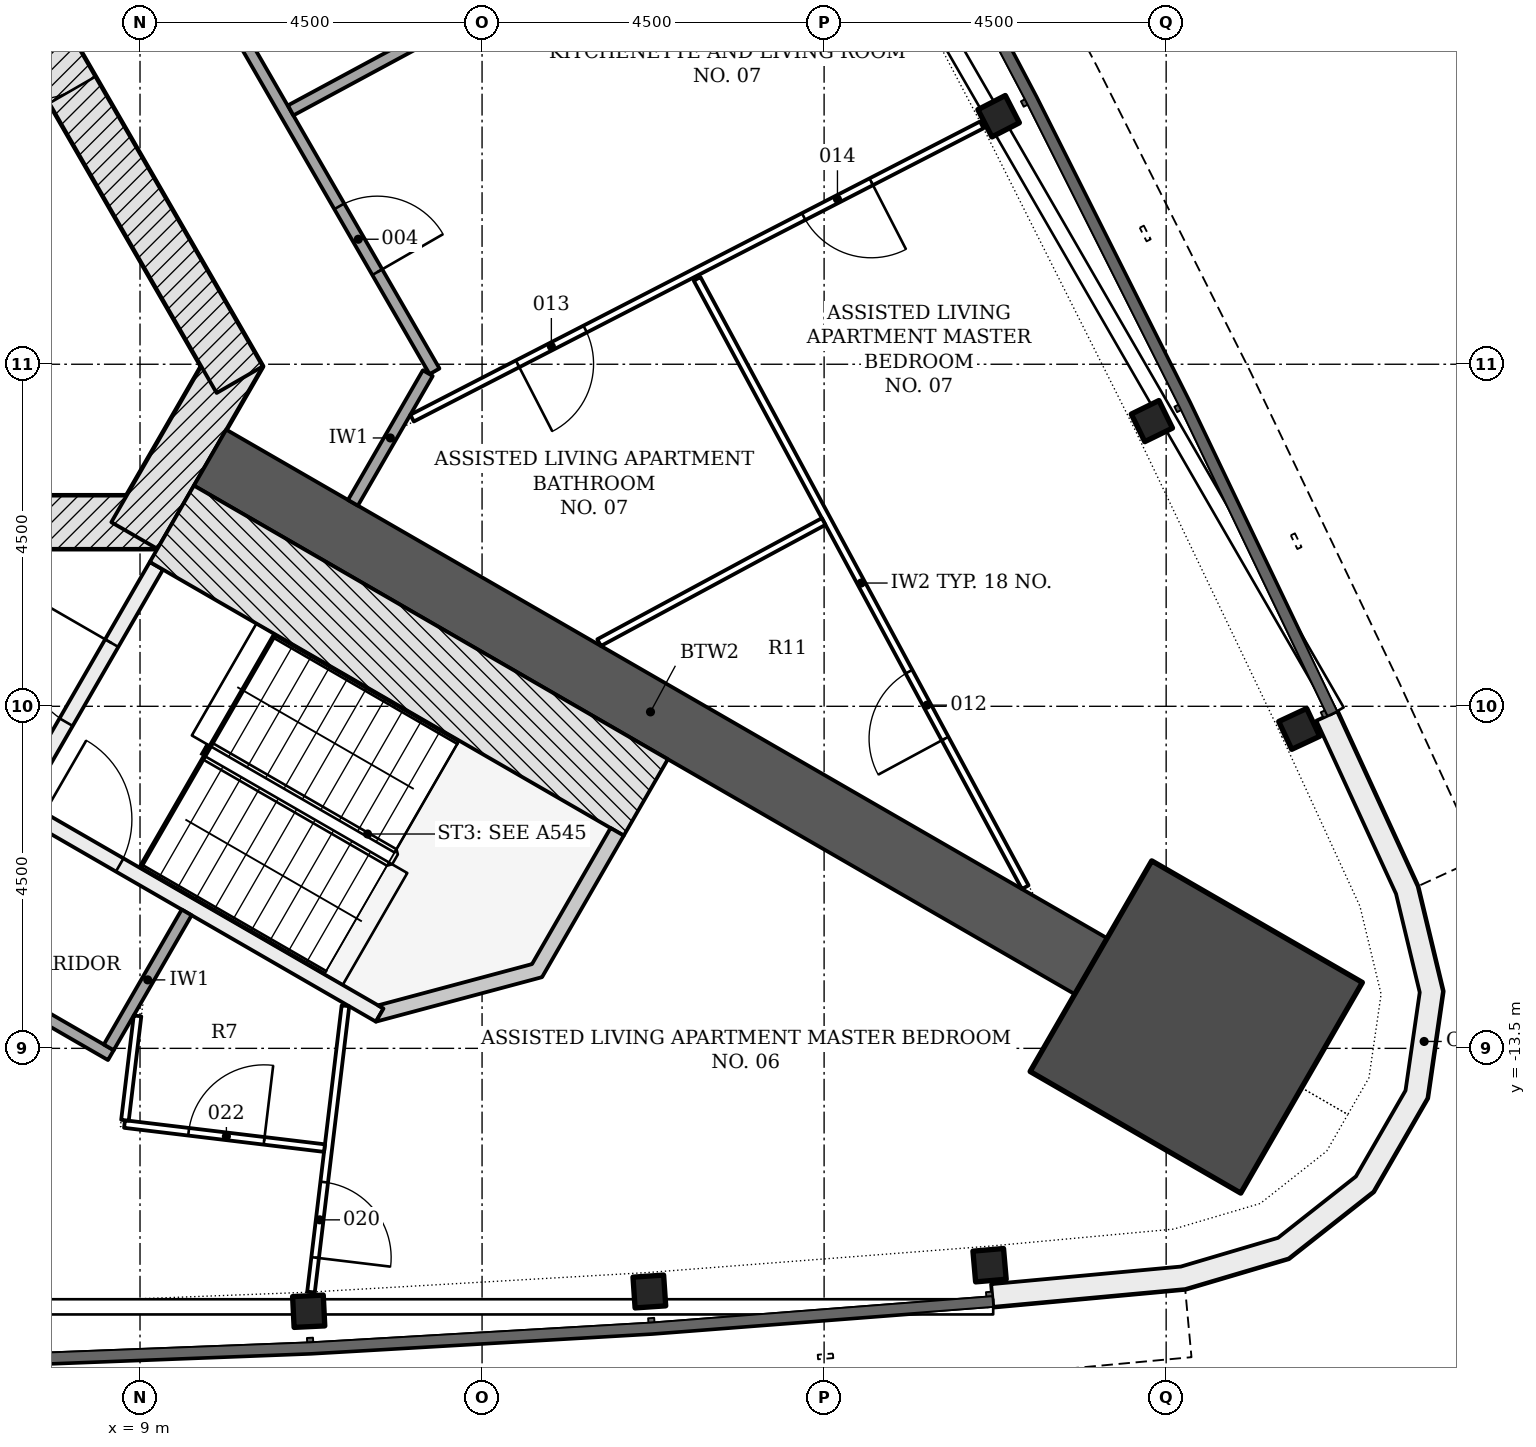
"""IFC4 building model, lengths in metres.
Left out: names, types, materials, properties, quantities, classifications, styles, units other than length and angle.
Written with IfcOpenShell. Run it as: python <this file> out.ifc"""

import sys

from ifc_helpers import new_model, si_unit, direction, frame, frame_2d, origin, origin_2d, place, context, subcontext, project, spatial, polyline, rectangle, i_section, outline, extrude, element, fill, save


model = new_model("IFC4")
c1 = context("Model", 3, precision=1e-05, world=origin(), true_north=direction((0.0, 1.0)))
c2 = subcontext(c1, "Body", "Model", "MODEL_VIEW")
j1 = project(units=[si_unit("LENGTHUNIT", "METRE"), si_unit("PLANEANGLEUNIT", "RADIAN")], contexts=[c1])
p1 = place(None, origin())
s1 = spatial("IfcSite", under=j1, at=p1, CompositionType="ELEMENT")
p2 = place(p1, origin())
s2 = spatial("IfcBuilding", under=s1, at=p2, CompositionType="ELEMENT")
p3 = place(p2, frame((0.0, 0.0, 72.6)))
s3 = spatial("IfcBuildingStorey", under=s2, at=p3, CompositionType="ELEMENT", Elevation=72.6)
p4 = place(p3, frame((-9.229, -6.578, -0.2), z_axis=(0.0, 0.0, 1.0), x_axis=(1.0, 0.0, 0.0)))
e1 = element("IfcWall", 1, at=p4, inside=s3, PredefinedType="SHEAR", context=c2, shape_type="SweptSolid", body=[
    extrude(rectangle(XDim=18.458, YDim=0.7, at=frame_2d((9.229, 0.0))), origin(), (0.0, 0.0, 1.0), 3.6),
])
p5 = place(p4, frame((3.304, 0.0, 0.2)))
e2 = element("IfcOpeningElement", 2, at=p5, cuts=e1, PredefinedType="OPENING", context=c2, shape_type="SweptSolid", body=[
    extrude(rectangle(XDim=1.1, YDim=2.1, at=frame_2d((0.55, 1.05))), frame((0.0, 0.36, 0.0), z_axis=(0.0, -1.0, 0.0), x_axis=(1.0, 0.0, 0.0)), (0.0, 0.0, 1.0), 0.72),
])
p6 = place(p4, frame((5.454, 0.0, 0.2)))
e3 = element("IfcOpeningElement", 3, at=p6, cuts=e1, PredefinedType="OPENING", context=c2, shape_type="SweptSolid", body=[
    extrude(rectangle(XDim=1.1, YDim=2.1, at=frame_2d((0.55, 1.05))), frame((0.0, 0.36, 0.0), z_axis=(0.0, -1.0, 0.0), x_axis=(1.0, 0.0, 0.0)), (0.0, 0.0, 1.0), 0.72),
])
p7 = place(p4, frame((7.604, 0.0, 0.2)))
e4 = element("IfcOpeningElement", 4, at=p7, cuts=e1, PredefinedType="OPENING", context=c2, shape_type="SweptSolid", body=[
    extrude(rectangle(XDim=1.1, YDim=2.1, at=frame_2d((0.55, 1.05))), frame((0.0, 0.36, 0.0), z_axis=(0.0, -1.0, 0.0), x_axis=(1.0, 0.0, 0.0)), (0.0, 0.0, 1.0), 0.72),
])
p8 = place(p4, frame((9.754, 0.0, 0.2)))
e5 = element("IfcOpeningElement", 5, at=p8, cuts=e1, PredefinedType="OPENING", context=c2, shape_type="SweptSolid", body=[
    extrude(rectangle(XDim=1.1, YDim=2.1, at=frame_2d((0.55, 1.05))), frame((0.0, 0.36, 0.0), z_axis=(0.0, -1.0, 0.0), x_axis=(1.0, 0.0, 0.0)), (0.0, 0.0, 1.0), 0.72),
])
p9 = place(p4, frame((11.904, 0.0, 0.2)))
e6 = element("IfcOpeningElement", 6, at=p9, cuts=e1, PredefinedType="OPENING", context=c2, shape_type="SweptSolid", body=[
    extrude(rectangle(XDim=1.1, YDim=2.1, at=frame_2d((0.55, 1.05))), frame((0.0, 0.36, 0.0), z_axis=(0.0, -1.0, 0.0), x_axis=(1.0, 0.0, 0.0)), (0.0, 0.0, 1.0), 0.72),
])
p10 = place(p4, frame((14.054, 0.0, 0.2)))
e7 = element("IfcOpeningElement", 7, at=p10, cuts=e1, PredefinedType="OPENING", context=c2, shape_type="SweptSolid", body=[
    extrude(rectangle(XDim=1.1, YDim=2.1, at=frame_2d((0.55, 1.05))), frame((0.0, 0.36, 0.0), z_axis=(0.0, -1.0, 0.0), x_axis=(1.0, 0.0, 0.0)), (0.0, 0.0, 1.0), 0.72),
])
p11 = place(p4, frame((1.029, 0.0, 0.2)))
e8 = element("IfcOpeningElement", 8, at=p11, cuts=e1, PredefinedType="OPENING", context=c2, shape_type="SweptSolid", body=[
    extrude(rectangle(XDim=1.0, YDim=2.1, at=frame_2d((0.5, 1.05))), frame((0.0, 0.36, 0.0), z_axis=(0.0, -1.0, 0.0), x_axis=(1.0, 0.0, 0.0)), (0.0, 0.0, 1.0), 0.72),
])
p12 = place(p3, frame((8.926, -6.753, -0.2), z_axis=(0.0, 0.0, 1.0), x_axis=(0.500042739161, 0.866000726912, 0.0)))
e9 = element("IfcWall", 9, at=p12, inside=s3, PredefinedType="SHEAR", context=c2, shape_type="SweptSolid", body=[
    extrude(rectangle(XDim=2.771, YDim=0.7, at=frame_2d((1.386, 0.0))), origin(), (0.0, 0.0, 1.0), 3.6),
])
p13 = place(p3, frame((10.311, -4.703, -0.2), z_axis=(0.0, 0.0, 1.0), x_axis=(-0.500001446645, 0.866024568562, 0.0)))
e10 = element("IfcWall", 10, at=p13, inside=s3, PredefinedType="SHEAR", context=c2, shape_type="SweptSolid", body=[
    extrude(rectangle(XDim=18.458, YDim=0.7, at=frame_2d((9.229, 0.0))), origin(), (0.0, 0.0, 1.0), 3.6),
])
p14 = place(p13, frame((9.5, 0.0, 0.2)))
e11 = element("IfcOpeningElement", 11, at=p14, cuts=e10, PredefinedType="OPENING", context=c2, shape_type="SweptSolid", body=[
    extrude(rectangle(XDim=1.0, YDim=2.1, at=frame_2d((0.5, 1.05))), frame((0.0, 0.36, 0.0), z_axis=(0.0, -1.0, 0.0), x_axis=(1.0, 0.0, 0.0)), (0.0, 0.0, 1.0), 0.72),
])
p15 = place(p13, frame((4.402, 0.0, 0.2)))
e12 = element("IfcOpeningElement", 12, at=p15, cuts=e10, PredefinedType="OPENING", context=c2, shape_type="SweptSolid", body=[
    extrude(rectangle(XDim=0.9, YDim=2.1, at=frame_2d((0.45, 1.05))), frame((0.0, 0.36, 0.0), z_axis=(0.0, -1.0, 0.0), x_axis=(1.0, 0.0, 0.0)), (0.0, 0.0, 1.0), 0.72),
])
p16 = place(p13, frame((13.927, 0.0, 0.2)))
e13 = element("IfcOpeningElement", 13, at=p16, cuts=e10, PredefinedType="OPENING", context=c2, shape_type="SweptSolid", body=[
    extrude(rectangle(XDim=0.9, YDim=2.1, at=frame_2d((0.45, 1.05))), frame((0.0, 0.36, 0.0), z_axis=(0.0, -1.0, 0.0), x_axis=(1.0, 0.0, 0.0)), (0.0, 0.0, 1.0), 0.72),
])
p17 = place(p3, frame((9.922, -5.728, -0.2), z_axis=(0.0, 0.0, 1.0), x_axis=(0.866026077102, -0.499998833779, 0.0)))
e14 = element("IfcWall", 14, at=p17, inside=s3, PredefinedType="SHEAR", context=c2, shape_type="SweptSolid", body=[
    extrude(rectangle(XDim=13.381, YDim=0.85, at=frame_2d((6.691, 0.0))), origin(), (0.0, 0.0, 1.0), 3.6),
])
p18 = place(p3, frame((22.896, -13.219, -0.2), z_axis=(0.0, 0.0, 1.0), x_axis=(0.866025403784, -0.5, 0.0)))
e15 = element("IfcColumn", 15, at=p18, inside=s3, PredefinedType="COLUMN", context=c2, shape_type="SweptSolid", body=[
    extrude(rectangle(XDim=3.2, YDim=3.2, at=origin_2d()), origin(), (0.0, 0.0, 1.0), 3.6),
])
for number, where, z_axis, x_axis in (
    (16, (11.219, -16.958, -0.2), (0.0, 0.0, 1.0), (0.999, 0.048, 0.0)),
    (17, (15.701, -16.699, -0.2), (0.0, 0.0, 1.0), (0.998, 0.067, 0.0)),
    (18, (20.177, -16.353, -0.2), (0.0, 0.0, 1.0), (0.996, 0.087, 0.0)),
    (19, (24.25, -9.297, -0.2), (0.0, 0.0, 1.0), (-0.423, 0.906, 0.0)),
    (20, (22.312, -5.248, -0.2), (0.0, 0.0, 1.0), (-0.44, 0.898, 0.0)),
    (21, (20.296, -1.237, -0.2), (0.0, 0.0, 1.0), (-0.458, 0.889, 0.0)),
):
    element("IfcColumn", number, at=place(p3, frame(where, z_axis=z_axis, x_axis=x_axis)), inside=s3, PredefinedType="COLUMN", context=c2, shape_type="SweptSolid", body=[
        extrude(i_section(OverallWidth=0.404, OverallDepth=0.406, WebThickness=0.027, FlangeThickness=0.044, FilletRadius=0.015, at=origin_2d()), origin(), (0.0, 0.0, 1.0), 3.6),
    ])
p19 = place(p3, origin())
e22 = element("IfcWall", 22, at=p19, inside=s3, PredefinedType="NOTDEFINED", context=c2, shape_type="SweptSolid", body=[
    extrude(outline(polyline([(20.225, -16.901), (22.75, -16.667), (24.112, -16.264), (25.228, -15.385), (25.938, -14.155), (26.141, -12.75), (25.809, -11.369), (24.749, -9.065), (24.476, -9.19), (25.524, -11.468), (25.836, -12.764), (25.649, -14.055), (24.997, -15.185), (23.972, -15.993), (22.693, -16.371), (20.197, -16.602), (20.225, -16.901)])), origin(), (0.0, 0.0, 1.0), 3.3),
])
p20 = place(p3, frame((7.44, -10.226, -0.2), z_axis=(0.0, 0.0, 1.0), x_axis=(0.500022077904, 0.866012656725, 0.0)))
e23 = element("IfcWall", 23, at=p20, inside=s3, PredefinedType="SHEAR", context=c2, shape_type="SweptSolid", body=[
    extrude(rectangle(XDim=3.55, YDim=0.2, at=frame_2d((1.775, 0.0))), origin(), (0.0, 0.0, 1.0), 3.6),
])
p21 = place(p20, frame((1.175, 0.0, 0.2)))
e24 = element("IfcOpeningElement", 24, at=p21, cuts=e23, PredefinedType="OPENING", context=c2, shape_type="SweptSolid", body=[
    extrude(rectangle(XDim=1.2, YDim=2.1, at=frame_2d((0.6, 1.05))), frame((0.0, 0.11, 0.0), z_axis=(0.0, -1.0, 0.0), x_axis=(1.0, 0.0, 0.0)), (0.0, 0.0, 1.0), 0.22),
])
p22 = place(p3, frame((7.304, -10.262, -0.2), z_axis=(0.0, 0.0, 1.0), x_axis=(0.866026594901, -0.49999793692, 0.0)))
e25 = element("IfcWall", 25, at=p22, inside=s3, PredefinedType="SHEAR", context=c2, shape_type="SweptSolid", body=[
    extrude(rectangle(XDim=5.6, YDim=0.2, at=frame_2d((2.8, 0.0))), origin(), (0.0, 0.0, 1.0), 3.6),
])
p23 = place(p22, frame((0.45, 0.0, 0.2)))
e26 = element("IfcOpeningElement", 26, at=p23, cuts=e25, PredefinedType="OPENING", context=c2, shape_type="SweptSolid", body=[
    extrude(rectangle(XDim=1.2, YDim=2.1, at=frame_2d((0.6, 1.05))), frame((0.0, 0.11, 0.0), z_axis=(0.0, -1.0, 0.0), x_axis=(1.0, 0.0, 0.0)), (0.0, 0.0, 1.0), 0.22),
])
p24 = place(p3, frame((9.419, -6.599, -0.2), z_axis=(0.0, 0.0, 1.0), x_axis=(0.866033125095, -0.499986626058, 0.0)))
e27 = element("IfcWall", 27, at=p24, inside=s3, PredefinedType="SHEAR", context=c2, shape_type="SweptSolid", body=[
    extrude(rectangle(XDim=7.2, YDim=1.161, at=frame_2d((3.6, 0.0))), origin(), (0.0, 0.0, 1.0), 3.6),
])
p25 = place(p3, frame((0.0, 0.0, -0.2)))
e28 = element("IfcWall", 28, at=p25, inside=s3, PredefinedType="SHEAR", context=c2, shape_type="SweptSolid", body=[
    extrude(outline(polyline([(12.104, -13.149), (14.289, -12.563), (15.364, -10.701), (15.191, -10.601), (14.157, -12.392), (12.132, -12.934), (12.204, -12.976), (12.204, -12.976), (12.204, -12.976), (12.204, -12.976), (12.204, -12.976), (12.204, -12.976), (12.204, -12.976), (12.204, -12.976), (12.204, -12.976), (12.204, -12.976), (12.204, -12.976), (12.204, -12.976), (12.204, -12.976), (12.204, -12.976), (12.204, -12.976), (12.204, -12.976), (12.204, -12.976), (12.104, -13.149)])), origin(), (0.0, 0.0, 1.0), 3.6),
])
p26 = place(p3, frame((5.346, 8.446, 0.0), z_axis=(0.0, 0.0, 1.0), x_axis=(0.500008781656, -0.866020333634, 0.0)))
e29 = element("IfcWall", 29, at=p26, inside=s3, PredefinedType="PARTITIONING", context=c2, shape_type="SweptSolid", body=[
    extrude(rectangle(XDim=15.057, YDim=0.15, at=frame_2d((7.528, 0.0))), origin(), (0.0, 0.0, 1.0), 2.778),
])
p27 = place(p26, frame((12.55, 0.0, 0.0)))
e30 = element("IfcOpeningElement", 30, at=p27, cuts=e29, PredefinedType="OPENING", context=c2, shape_type="SweptSolid", body=[
    extrude(rectangle(XDim=1.0, YDim=2.1, at=frame_2d((0.5, 1.05))), frame((0.0, 0.085, 0.0), z_axis=(0.0, -1.0, 0.0), x_axis=(1.0, 0.0, 0.0)), (0.0, 0.0, 1.0), 0.17),
])
p28 = place(p26, frame((6.753, 0.0, 0.0)))
e31 = element("IfcOpeningElement", 31, at=p28, cuts=e29, PredefinedType="OPENING", context=c2, shape_type="SweptSolid", body=[
    extrude(rectangle(XDim=1.0, YDim=2.1, at=frame_2d((0.5, 1.05))), frame((0.0, 0.085, 0.0), z_axis=(0.0, -1.0, 0.0), x_axis=(1.0, 0.0, 0.0)), (0.0, 0.0, 1.0), 0.17),
])
p29 = place(p3, frame((8.616, -13.589, 0.0), z_axis=(0.0, 0.0, 1.0), x_axis=(-0.866039313704, 0.499975906538, 0.0)))
e32 = element("IfcWall", 32, at=p29, inside=s3, PredefinedType="PARTITIONING", context=c2, shape_type="SweptSolid", body=[
    extrude(rectangle(XDim=5.892, YDim=0.15, at=frame_2d((2.946, 0.0))), origin(), (0.0, 0.0, 1.0), 2.778),
])
p30 = place(p29, frame((2.475, 0.0, 0.0)))
e33 = element("IfcOpeningElement", 33, at=p30, cuts=e32, PredefinedType="OPENING", context=c2, shape_type="SweptSolid", body=[
    extrude(rectangle(XDim=1.0, YDim=2.1, at=frame_2d((0.5, 1.05))), frame((0.0, 0.085, 0.0), z_axis=(0.0, -1.0, 0.0), x_axis=(1.0, 0.0, 0.0)), (0.0, 0.0, 1.0), 0.17),
])
p31 = place(p3, frame((8.589, -13.487, 0.0), z_axis=(0.0, 0.0, 1.0), x_axis=(0.499956128963, 0.866050731258, 0.0)))
e34 = element("IfcWall", 34, at=p31, inside=s3, PredefinedType="PARTITIONING", context=c2, shape_type="SweptSolid", body=[
    extrude(rectangle(XDim=2.05, YDim=0.15, at=frame_2d((1.025, 0.0))), origin(), (0.0, 0.0, 1.0), 3.4),
])
p32 = place(p3, frame((11.801, -6.323, 0.0), z_axis=(0.0, 0.0, 1.0), x_axis=(0.500058665202, 0.865991530765, 0.0)))
e35 = element("IfcWall", 35, at=p32, inside=s3, PredefinedType="PARTITIONING", context=c2, shape_type="SweptSolid", body=[
    extrude(rectangle(XDim=1.969, YDim=0.15, at=frame_2d((0.985, 0.0))), origin(), (0.0, 0.0, 1.0), 2.778),
])
p33 = place(p3, frame((17.983, 2.616, 0.0), z_axis=(0.0, 0.0, 1.0), x_axis=(-0.880118053528, -0.474754896608, 0.0)))
e36 = element("IfcWall", 36, at=p33, inside=s3, PredefinedType="PARTITIONING", context=c2, shape_type="SweptSolid", body=[
    extrude(rectangle(XDim=7.955, YDim=0.15, at=frame_2d((3.978, 0.0))), origin(), (0.0, 0.0, 1.0), 2.778),
])
p34 = place(p3, frame((20.646, -11.38, 0.0), z_axis=(0.0, 0.0, 1.0), x_axis=(-0.474727306664, 0.880132935588, 0.0)))
e37 = element("IfcWall", 37, at=p34, inside=s3, PredefinedType="PARTITIONING", context=c2, shape_type="SweptSolid", body=[
    extrude(rectangle(XDim=9.094, YDim=0.1, at=frame_2d((4.547, 0.0))), origin(), (0.0, 0.0, 1.0), 2.778),
])
p35 = place(p34, frame((2.222, 0.0, 0.0)))
e38 = element("IfcOpeningElement", 38, at=p35, cuts=e37, PredefinedType="OPENING", context=c2, shape_type="SweptSolid", body=[
    extrude(rectangle(XDim=1.0, YDim=2.1, at=frame_2d((0.5, 1.05))), frame((0.0, 0.06, 0.0), z_axis=(0.0, -1.0, 0.0), x_axis=(1.0, 0.0, 0.0)), (0.0, 0.0, 1.0), 0.12),
])
p36 = place(p3, frame((20.074, -1.351, 0.0), z_axis=(0.0, 0.0, 1.0), x_axis=(-0.88912315758, -0.457668013582, 0.0)))
e39 = element("IfcWall", 39, at=p36, inside=s3, PredefinedType="PARTITIONING", context=c2, shape_type="SweptSolid", body=[
    extrude(rectangle(XDim=8.429, YDim=0.1, at=frame_2d((4.214, 0.0))), origin(), (0.0, 0.0, 1.0), 2.778),
])
p37 = place(p36, frame((5.868, 0.0, 0.0)))
e40 = element("IfcOpeningElement", 40, at=p37, cuts=e39, PredefinedType="OPENING", context=c2, shape_type="SweptSolid", body=[
    extrude(rectangle(XDim=1.0, YDim=2.1, at=frame_2d((0.5, 1.05))), frame((0.0, 0.06, 0.0), z_axis=(0.0, -1.0, 0.0), x_axis=(1.0, 0.0, 0.0)), (0.0, 0.0, 1.0), 0.12),
])
p38 = place(p36, frame((1.635, 0.0, 0.0)))
e41 = element("IfcOpeningElement", 41, at=p38, cuts=e39, PredefinedType="OPENING", context=c2, shape_type="SweptSolid", body=[
    extrude(rectangle(XDim=1.0, YDim=2.1, at=frame_2d((0.5, 1.05))), frame((0.0, 0.06, 0.0), z_axis=(0.0, -1.0, 0.0), x_axis=(1.0, 0.0, 0.0)), (0.0, 0.0, 1.0), 0.12),
])
p39 = place(p3, frame((11.703, -12.94, 0.0), z_axis=(0.0, 0.0, 1.0), x_axis=(-0.119454840068, -0.99283963518, 0.0)))
e42 = element("IfcWall", 42, at=p39, inside=s3, PredefinedType="PARTITIONING", context=c2, shape_type="SweptSolid", body=[
    extrude(rectangle(XDim=3.793, YDim=0.1, at=frame_2d((1.896, 0.0))), origin(), (0.0, 0.0, 1.0), 2.923),
])
p40 = place(p39, frame((2.336, 0.0, 0.0)))
e43 = element("IfcOpeningElement", 43, at=p40, cuts=e42, PredefinedType="OPENING", context=c2, shape_type="SweptSolid", body=[
    extrude(rectangle(XDim=1.0, YDim=2.1, at=frame_2d((0.5, 1.05))), frame((0.0, 0.06, 0.0), z_axis=(0.0, -1.0, 0.0), x_axis=(1.0, 0.0, 0.0)), (0.0, 0.0, 1.0), 0.12),
])
p41 = place(p3, frame((17.994, -6.569, 0.0), z_axis=(0.0, 0.0, 1.0), x_axis=(-0.880148573472, -0.474698313263, 0.0)))
e44 = element("IfcWall", 44, at=p41, inside=s3, PredefinedType="PARTITIONING", context=c2, shape_type="SweptSolid", body=[
    extrude(rectangle(XDim=3.356, YDim=0.1, at=frame_2d((1.678, 0.0))), origin(), (0.0, 0.0, 1.0), 3.4),
])
p42 = place(p3, frame((8.796, -14.496, 0.0), z_axis=(0.0, 0.0, 1.0), x_axis=(0.992835802838, -0.119486687973, 0.0)))
e45 = element("IfcWall", 45, at=p42, inside=s3, PredefinedType="PARTITIONING", context=c2, shape_type="SweptSolid", body=[
    extrude(rectangle(XDim=2.65, YDim=0.1, at=frame_2d((1.325, 0.0))), origin(), (0.0, 0.0, 1.0), 2.923),
])
p43 = place(p42, frame((0.85, 0.0, 0.0)))
e46 = element("IfcOpeningElement", 46, at=p43, cuts=e45, PredefinedType="OPENING", context=c2, shape_type="SweptSolid", body=[
    extrude(rectangle(XDim=1.0, YDim=2.1, at=frame_2d((0.5, 1.05))), frame((0.0, 0.06, 0.0), z_axis=(0.0, -1.0, 0.0), x_axis=(1.0, 0.0, 0.0)), (0.0, 0.0, 1.0), 0.12),
])
p44 = place(p3, frame((8.967, -13.073, 0.0), z_axis=(0.0, 0.0, 1.0), x_axis=(-0.119493210152, -0.992835017879, 0.0)))
e47 = element("IfcWall", 47, at=p44, inside=s3, PredefinedType="PARTITIONING", context=c2, shape_type="SweptSolid", body=[
    extrude(rectangle(XDim=1.383, YDim=0.1, at=frame_2d((0.692, 0.0))), origin(), (0.0, 0.0, 1.0), 3.4),
])
p45 = place(p15, origin())
e48 = element("IfcDoor", 48, at=p45, inside=s3, OperationType="SINGLE_SWING_RIGHT", PredefinedType="DOOR", context=c2, shape_type="SweptSolid", body=[
    extrude(rectangle(XDim=0.9, YDim=2.1, at=frame_2d((0.45, 1.05))), frame((0.0, 0.075, 0.0), z_axis=(0.0, -1.0, 0.0), x_axis=(1.0, 0.0, 0.0)), (0.0, 0.0, 1.0), 0.15),
])
fill(e12, e48)
p46 = place(p21, origin())
e49 = element("IfcDoor", 49, at=p46, inside=s3, OperationType="SINGLE_SWING_RIGHT", PredefinedType="DOOR", context=c2, shape_type="SweptSolid", body=[
    extrude(rectangle(XDim=1.2, YDim=2.1, at=frame_2d((0.6, 1.05))), frame((0.0, 0.025, 0.0), z_axis=(0.0, -1.0, 0.0), x_axis=(1.0, 0.0, 0.0)), (0.0, 0.0, 1.0), 0.05),
])
fill(e24, e49)
p47 = place(p23, origin())
e50 = element("IfcDoor", 50, at=p47, inside=s3, OperationType="SINGLE_SWING_LEFT", PredefinedType="DOOR", context=c2, shape_type="SweptSolid", body=[
    extrude(rectangle(XDim=1.2, YDim=2.1, at=frame_2d((0.6, 1.05))), frame((0.0, 0.025, 0.0), z_axis=(0.0, -1.0, 0.0), x_axis=(1.0, 0.0, 0.0)), (0.0, 0.0, 1.0), 0.05),
])
fill(e26, e50)
p48 = place(p27, origin())
e51 = element("IfcDoor", 51, at=p48, inside=s3, OperationType="SINGLE_SWING_RIGHT", PredefinedType="DOOR", context=c2, shape_type="SweptSolid", body=[
    extrude(rectangle(XDim=1.0, YDim=2.1, at=frame_2d((0.5, 1.05))), frame((0.0, 0.025, 0.0), z_axis=(0.0, -1.0, 0.0), x_axis=(1.0, 0.0, 0.0)), (0.0, 0.0, 1.0), 0.05),
])
fill(e30, e51)
p49 = place(p35, origin())
e52 = element("IfcDoor", 52, at=p49, inside=s3, OperationType="SINGLE_SWING_LEFT", PredefinedType="DOOR", context=c2, shape_type="SweptSolid", body=[
    extrude(rectangle(XDim=1.0, YDim=2.1, at=frame_2d((0.5, 1.05))), frame((0.0, 0.025, 0.0), z_axis=(0.0, -1.0, 0.0), x_axis=(1.0, 0.0, 0.0)), (0.0, 0.0, 1.0), 0.05),
])
fill(e38, e52)
p50 = place(p37, origin())
e53 = element("IfcDoor", 53, at=p50, inside=s3, OperationType="SINGLE_SWING_RIGHT", PredefinedType="DOOR", context=c2, shape_type="SweptSolid", body=[
    extrude(rectangle(XDim=1.0, YDim=2.1, at=frame_2d((0.5, 1.05))), frame((0.0, 0.025, 0.0), z_axis=(0.0, -1.0, 0.0), x_axis=(1.0, 0.0, 0.0)), (0.0, 0.0, 1.0), 0.05),
])
fill(e40, e53)
p51 = place(p38, origin())
e54 = element("IfcDoor", 54, at=p51, inside=s3, OperationType="SINGLE_SWING_LEFT", PredefinedType="DOOR", context=c2, shape_type="SweptSolid", body=[
    extrude(rectangle(XDim=1.0, YDim=2.1, at=frame_2d((0.5, 1.05))), frame((0.0, 0.025, 0.0), z_axis=(0.0, -1.0, 0.0), x_axis=(1.0, 0.0, 0.0)), (0.0, 0.0, 1.0), 0.05),
])
fill(e41, e54)
p52 = place(p40, origin())
e55 = element("IfcDoor", 55, at=p52, inside=s3, OperationType="SINGLE_SWING_RIGHT", PredefinedType="DOOR", context=c2, shape_type="SweptSolid", body=[
    extrude(rectangle(XDim=1.0, YDim=2.1, at=frame_2d((0.5, 1.05))), frame((0.0, 0.025, 0.0), z_axis=(0.0, -1.0, 0.0), x_axis=(1.0, 0.0, 0.0)), (0.0, 0.0, 1.0), 0.05),
])
fill(e43, e55)
p53 = place(p43, origin())
e56 = element("IfcDoor", 56, at=p53, inside=s3, OperationType="SINGLE_SWING_RIGHT", PredefinedType="DOOR", context=c2, shape_type="SweptSolid", body=[
    extrude(rectangle(XDim=1.0, YDim=2.1, at=frame_2d((0.5, 1.05))), frame((0.0, 0.025, 0.0), z_axis=(0.0, -1.0, 0.0), x_axis=(1.0, 0.0, 0.0)), (0.0, 0.0, 1.0), 0.05),
])
fill(e46, e56)
save(model, sys.argv[1])
